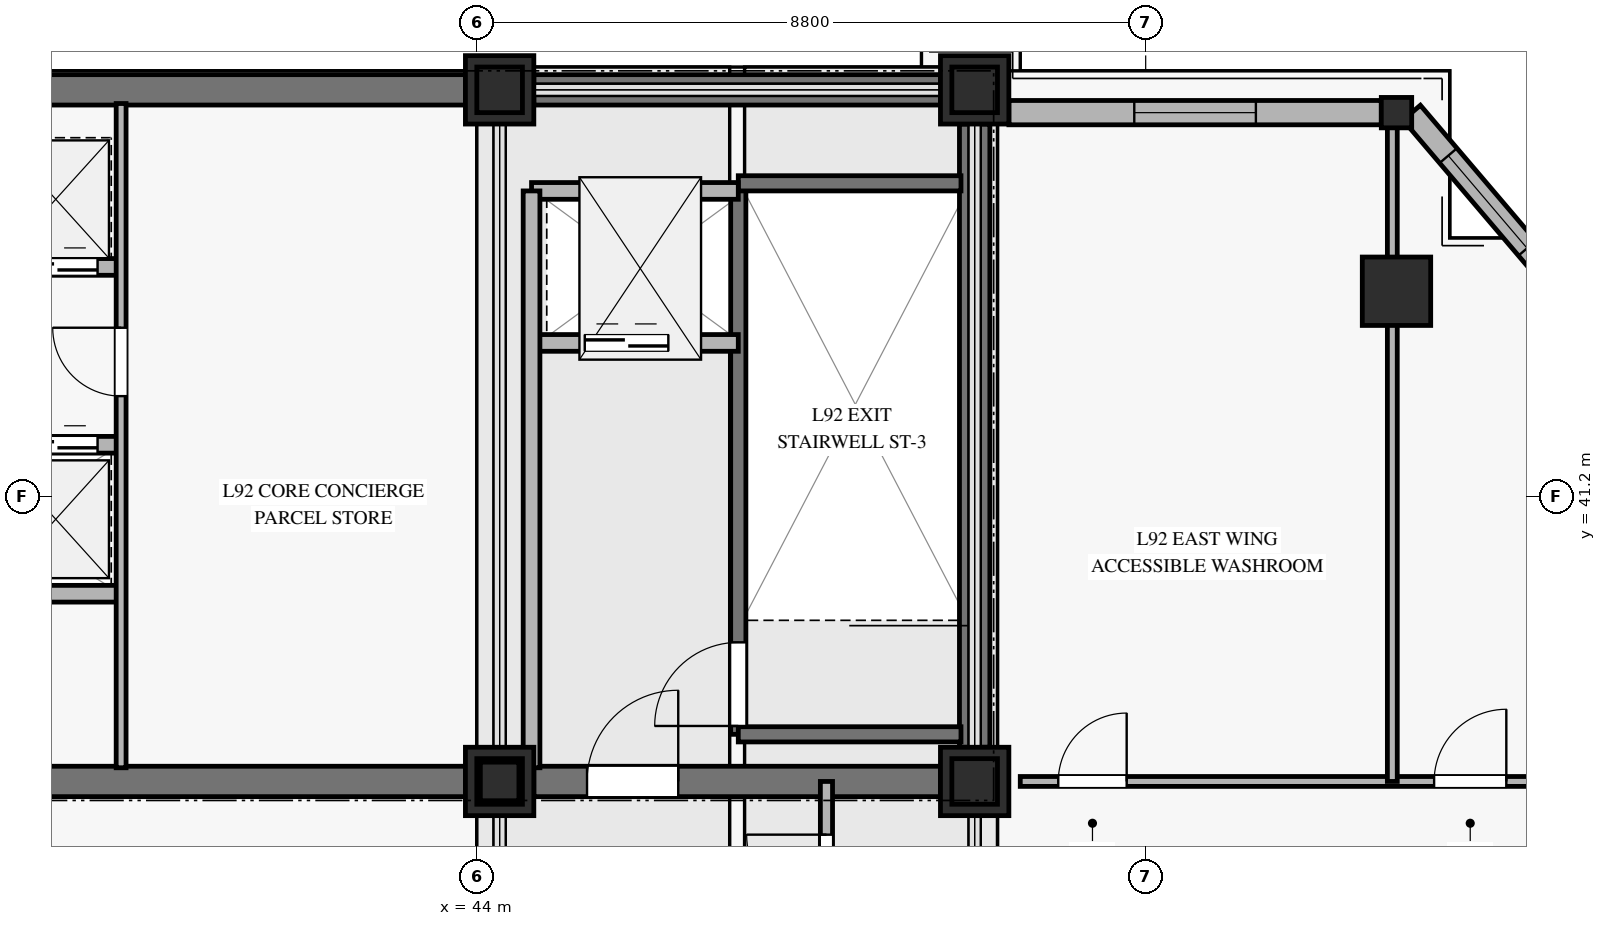
"""IFC4 building model, lengths in metres.
Left out: names, types, materials, properties, quantities, classifications, styles, units other than length and angle.
Written with IfcOpenShell. Run it as: python <this file> out.ifc"""

import sys

from ifc_helpers import new_model, si_unit, direction, frame, frame_2d, origin, origin_2d, place, context, subcontext, project, spatial, rectangle, hollow_rectangle, hollow_circle, extrude, source, transform, mapped, element, fill, save


model = new_model("IFC4")
c1 = context("Model", 3, precision=1e-05, world=origin(), true_north=direction((0.0, 1.0)))
c2 = subcontext(c1, "Body", "Model", "MODEL_VIEW")
j1 = project(units=[si_unit("LENGTHUNIT", "METRE"), si_unit("PLANEANGLEUNIT", "RADIAN")], contexts=[c1])
p1 = place(None, origin())
s1 = spatial("IfcSite", under=j1, at=p1, CompositionType="ELEMENT")
p2 = place(p1, origin())
s2 = spatial("IfcBuilding", under=s1, at=p2, CompositionType="ELEMENT")
p3 = place(p2, frame((0.0, 0.0, 352.7)))
s3 = spatial("IfcBuildingStorey", under=s2, at=p3, CompositionType="ELEMENT", Elevation=352.7)
m1 = source(origin(), c2, "Body", "SweptSolid", [
    extrude(rectangle(XDim=0.9, YDim=0.9, at=origin_2d()), origin(), (0.0, 0.0, 1.0), 6.16),
])
for number, where, z_axis, x_axis in (
    (1, (44.3, 37.45, 0.0), (0.0, 0.0, 1.0), (1.0, 0.0, 0.0)),
    (2, (44.3, 46.55, 0.0), (0.0, 0.0, 1.0), (1.0, 0.0, 0.0)),
    (3, (50.55, 37.45, 0.0), (0.0, 0.0, 1.0), (1.0, 0.0, 0.0)),
    (4, (50.55, 46.55, 0.0), (0.0, 0.0, 1.0), (1.0, 0.0, 0.0)),
):
    element("IfcColumn", number, at=place(p3, frame(where, z_axis=z_axis, x_axis=x_axis)), inside=s3, PredefinedType="PILASTER", context=c2, shape_type="MappedRepresentation", body=[
        mapped(m1, transform((0.0, 0.0, 0.0), x_axis=(1.0, 0.0, 0.0), y_axis=(0.0, 1.0, 0.0), z_axis=(0.0, 0.0, 1.0), scale=1.0)),
    ])
p4 = place(p3, frame((36.05, 46.55, 0.0), z_axis=(0.0, 0.0, 1.0), x_axis=(1.0, 0.0, 0.0)))
e5 = element("IfcWall", 5, at=p4, inside=s3, PredefinedType="SHEAR", context=c2, shape_type="SweptSolid", body=[
    extrude(rectangle(XDim=7.8, YDim=0.4, at=frame_2d((3.9, 0.0))), origin(), (0.0, 0.0, 1.0), 6.16),
])
p5 = place(p3, frame((44.75, 46.55, 0.0), z_axis=(0.0, 0.0, 1.0), x_axis=(1.0, 0.0, 0.0)))
e6 = element("IfcWall", 6, at=p5, inside=s3, PredefinedType="SHEAR", context=c2, shape_type="SweptSolid", body=[
    extrude(rectangle(XDim=5.35, YDim=0.4, at=frame_2d((2.675, 0.0))), origin(), (0.0, 0.0, 1.0), 6.16),
])
p6 = place(p3, frame((36.05, 37.45, 0.0), z_axis=(0.0, 0.0, 1.0), x_axis=(1.0, 0.0, 0.0)))
e7 = element("IfcWall", 7, at=p6, inside=s3, PredefinedType="SHEAR", context=c2, shape_type="SweptSolid", body=[
    extrude(rectangle(XDim=7.8, YDim=0.4, at=frame_2d((3.9, 0.0))), origin(), (0.0, 0.0, 1.0), 6.16),
])
p7 = place(p3, frame((44.75, 37.45, 0.0), z_axis=(0.0, 0.0, 1.0), x_axis=(1.0, 0.0, 0.0)))
e8 = element("IfcWall", 8, at=p7, inside=s3, PredefinedType="SHEAR", context=c2, shape_type="SweptSolid", body=[
    extrude(rectangle(XDim=5.35, YDim=0.4, at=frame_2d((2.675, 0.0))), origin(), (0.0, 0.0, 1.0), 6.16),
])
p8 = place(p7, frame((0.7, 0.0, 0.0)))
e9 = element("IfcOpeningElement", 9, at=p8, cuts=e8, PredefinedType="OPENING", context=c2, shape_type="SweptSolid", body=[
    extrude(rectangle(XDim=1.2, YDim=2.15, at=frame_2d((0.6, 1.075))), frame((0.0, 0.21, 0.0), z_axis=(0.0, -1.0, 0.0), x_axis=(1.0, 0.0, 0.0)), (0.0, 0.0, 1.0), 0.42),
])
p9 = place(p3, frame((50.55, 37.9, 0.0), z_axis=(0.0, 0.0, 1.0), x_axis=(0.0, 1.0, 0.0)))
e10 = element("IfcWall", 10, at=p9, inside=s3, PredefinedType="SHEAR", context=c2, shape_type="SweptSolid", body=[
    extrude(rectangle(XDim=8.2, YDim=0.4, at=frame_2d((4.1, 0.0))), origin(), (0.0, 0.0, 1.0), 6.16),
])
m2 = source(origin(), c2, "Body", "SweptSolid", [
    extrude(hollow_rectangle(XDim=0.9, YDim=0.9, WallThickness=0.04, at=origin_2d()), origin(), (0.0, 0.0, 1.0), 6.16),
])
p10 = place(p3, frame((56.1, 43.9, 0.0), z_axis=(0.0, 0.0, 1.0), x_axis=(1.0, 0.0, 0.0)))
e11 = element("IfcColumn", 11, at=p10, inside=s3, PredefinedType="COLUMN", context=c2, shape_type="MappedRepresentation", body=[
    mapped(m2, transform((0.0, 0.0, 0.0), x_axis=(1.0, 0.0, 0.0), y_axis=(0.0, 1.0, 0.0), z_axis=(0.0, 0.0, 1.0), scale=1.0)),
])
m3 = source(origin(), c2, "Body", "SweptSolid", [
    extrude(hollow_rectangle(XDim=0.4, YDim=0.4, WallThickness=0.02, at=origin_2d()), origin(), (0.0, 0.0, 1.0), 6.16),
])
p11 = place(p3, frame((56.1, 46.25, 0.0), z_axis=(0.0, 0.0, 1.0), x_axis=(1.0, 0.0, 0.0)))
e12 = element("IfcColumn", 12, at=p11, inside=s3, PredefinedType="COLUMN", context=c2, shape_type="MappedRepresentation", body=[
    mapped(m3, transform((0.0, 0.0, 0.0), x_axis=(1.0, 0.0, 0.0), y_axis=(0.0, 1.0, 0.0), z_axis=(0.0, 0.0, 1.0), scale=1.0)),
])
m4 = source(origin(), c2, "Body", "SweptSolid", [
    extrude(hollow_rectangle(XDim=0.6, YDim=0.6, WallThickness=0.028, at=origin_2d()), origin(), (0.0, 0.0, 1.0), 32.096),
])
for number, where, z_axis, x_axis in (
    (13, (50.55, 37.45, 6.4), (0.0, 0.0, 1.0), (1.0, 0.0, 0.0)),
    (14, (50.55, 46.55, 6.4), (0.0, 0.0, 1.0), (1.0, 0.0, 0.0)),
    (15, (44.3, 46.55, 6.4), (0.0, 0.0, 1.0), (1.0, 0.0, 0.0)),
    (16, (44.3, 37.45, 6.4), (0.0, 0.0, 1.0), (1.0, 0.0, 0.0)),
):
    element("IfcColumn", number, at=place(p3, frame(where, z_axis=z_axis, x_axis=x_axis)), inside=s3, PredefinedType="COLUMN", context=c2, shape_type="MappedRepresentation", body=[
        mapped(m4, transform((0.0, 0.0, 0.0), x_axis=(1.0, 0.0, 0.0), y_axis=(0.0, 1.0, 0.0), z_axis=(0.0, 0.0, 1.0), scale=1.0)),
    ])
m5 = source(origin(), c2, "Body", "SweptSolid", [
    extrude(hollow_circle(Radius=0.254, WallThickness=0.024, at=origin_2d()), origin(), (0.0, 0.0, 1.0), 1.704),
])
p12 = place(p3, frame((44.3, 37.45, 38.496), z_axis=(0.0, 0.0, 1.0), x_axis=(1.0, 0.0, 0.0)))
e17 = element("IfcColumn", 17, at=p12, inside=s3, PredefinedType="COLUMN", context=c2, shape_type="MappedRepresentation", body=[
    mapped(m5, transform((0.0, 0.0, 0.0), x_axis=(1.0, 0.0, 0.0), y_axis=(0.0, 1.0, 0.0), z_axis=(0.0, 0.0, 1.0), scale=1.0)),
])
p13 = place(p3, frame((51.0, 46.25, 0.0), z_axis=(0.0, 0.0, 1.0), x_axis=(1.0, 0.0, 0.0)))
e18 = element("IfcWall", 18, at=p13, inside=s3, PredefinedType="SOLIDWALL", context=c2, shape_type="SweptSolid", body=[
    extrude(rectangle(XDim=4.9, YDim=0.32, at=frame_2d((2.45, 0.0))), origin(), (0.0, 0.0, 1.0), 5.79),
])
p14 = place(p13, frame((1.65, 0.0, 0.45)))
e19 = element("IfcOpeningElement", 19, at=p14, cuts=e18, PredefinedType="OPENING", context=c2, shape_type="SweptSolid", body=[
    extrude(rectangle(XDim=1.6, YDim=2.0, at=frame_2d((0.8, 1.0))), frame((0.0, 0.17, 0.0), z_axis=(0.0, -1.0, 0.0), x_axis=(1.0, 0.0, 0.0)), (0.0, 0.0, 1.0), 0.34),
])
p15 = place(p3, frame((58.3, 43.9, 0.0), z_axis=(0.0, 0.0, 1.0), x_axis=(-0.648103010114, 0.761552682538, 0.0)))
e20 = element("IfcWall", 20, at=p15, inside=s3, PredefinedType="SOLIDWALL", context=c2, shape_type="SweptSolid", body=[
    extrude(rectangle(XDim=3.086, YDim=0.3, at=frame_2d((1.543, 0.0))), origin(), (0.0, 0.0, 1.0), 5.79),
])
p16 = place(p15, frame((0.743, 0.0, 0.45)))
e21 = element("IfcOpeningElement", 21, at=p16, cuts=e20, PredefinedType="OPENING", context=c2, shape_type="SweptSolid", body=[
    extrude(rectangle(XDim=1.6, YDim=2.0, at=frame_2d((0.8, 1.0))), frame((0.0, 0.16, 0.0), z_axis=(0.0, -1.0, 0.0), x_axis=(1.0, 0.0, 0.0)), (0.0, 0.0, 1.0), 0.32),
])
p17 = place(p3, frame((47.44, 38.07, 0.0), z_axis=(0.0, 0.0, 1.0), x_axis=(0.0, 1.0, 0.0)))
e22 = element("IfcWall", 22, at=p17, inside=s3, PredefinedType="SOLIDWALL", context=c2, shape_type="SweptSolid", body=[
    extrude(rectangle(XDim=7.25, YDim=0.2, at=frame_2d((3.625, 0.0))), origin(), (0.0, 0.0, 1.0), 6.4),
])
p18 = place(p17, frame((0.11, 0.0, 0.0)))
e23 = element("IfcOpeningElement", 23, at=p18, cuts=e22, PredefinedType="OPENING", context=c2, shape_type="SweptSolid", body=[
    extrude(rectangle(XDim=1.1, YDim=2.15, at=frame_2d((0.55, 1.075))), frame((0.0, 0.11, 0.0), z_axis=(0.0, -1.0, 0.0), x_axis=(1.0, 0.0, 0.0)), (0.0, 0.0, 1.0), 0.22),
])
for number, where, z_axis, x_axis in (
    (24, (47.44, 45.32, 0.0), (0.0, 0.0, 1.0), (1.0, 0.0, 0.0)),
    (25, (47.44, 38.07, 0.0), (0.0, 0.0, 1.0), (1.0, 0.0, 0.0)),
):
    element("IfcWall", number, at=place(p3, frame(where, z_axis=z_axis, x_axis=x_axis)), inside=s3, PredefinedType="SOLIDWALL", context=c2, shape_type="SweptSolid", body=[
        extrude(rectangle(XDim=2.93, YDim=0.2, at=frame_2d((1.465, 0.0))), origin(), (0.0, 0.0, 1.0), 6.4),
    ])
p19 = place(p3, frame((44.72, 43.22, 0.0), z_axis=(0.0, 0.0, 1.0), x_axis=(1.0, 0.0, 0.0)))
e26 = element("IfcWall", 26, at=p19, inside=s3, PredefinedType="SOLIDWALL", context=c2, shape_type="SweptSolid", body=[
    extrude(rectangle(XDim=2.72, YDim=0.22, at=frame_2d((1.36, 0.0))), origin(), (0.0, 0.0, 1.0), 6.16),
])
p20 = place(p19, frame((0.7, 0.0, 0.0)))
e27 = element("IfcOpeningElement", 27, at=p20, cuts=e26, PredefinedType="OPENING", context=c2, shape_type="SweptSolid", body=[
    extrude(rectangle(XDim=1.1, YDim=2.2, at=frame_2d((0.55, 1.1))), frame((0.0, 0.12, 0.0), z_axis=(0.0, -1.0, 0.0), x_axis=(1.0, 0.0, 0.0)), (0.0, 0.0, 1.0), 0.24),
])
p21 = place(p3, frame((44.72, 45.22, 0.0), z_axis=(0.0, 0.0, 1.0), x_axis=(1.0, 0.0, 0.0)))
e28 = element("IfcWall", 28, at=p21, inside=s3, PredefinedType="SOLIDWALL", context=c2, shape_type="SweptSolid", body=[
    extrude(rectangle(XDim=2.72, YDim=0.22, at=frame_2d((1.36, 0.0))), origin(), (0.0, 0.0, 1.0), 6.16),
])
p22 = place(p3, frame((44.72, 37.63, 0.0), z_axis=(0.0, 0.0, 1.0), x_axis=(0.0, 1.0, 0.0)))
e29 = element("IfcWall", 29, at=p22, inside=s3, PredefinedType="SOLIDWALL", context=c2, shape_type="SweptSolid", body=[
    extrude(rectangle(XDim=7.59, YDim=0.22, at=frame_2d((3.795, 0.0))), origin(), (0.0, 0.0, 1.0), 6.16),
])
p23 = place(p3, frame((36.12, 44.22, 0.0), z_axis=(0.0, 0.0, 1.0), x_axis=(1.0, 0.0, 0.0)))
e30 = element("IfcWall", 30, at=p23, inside=s3, PredefinedType="SOLIDWALL", context=c2, shape_type="SweptSolid", body=[
    extrude(rectangle(XDim=3.2, YDim=0.22, at=frame_2d((1.6, 0.0))), origin(), (0.0, 0.0, 1.0), 6.16),
])
p24 = place(p23, frame((0.3, 0.0, 0.0)))
e31 = element("IfcOpeningElement", 31, at=p24, cuts=e30, PredefinedType="OPENING", context=c2, shape_type="SweptSolid", body=[
    extrude(rectangle(XDim=1.1, YDim=2.2, at=frame_2d((0.55, 1.1))), frame((0.0, 0.12, 0.0), z_axis=(0.0, -1.0, 0.0), x_axis=(1.0, 0.0, 0.0)), (0.0, 0.0, 1.0), 0.24),
])
p25 = place(p23, frame((1.79, 0.0, 0.0)))
e32 = element("IfcOpeningElement", 32, at=p25, cuts=e30, PredefinedType="OPENING", context=c2, shape_type="SweptSolid", body=[
    extrude(rectangle(XDim=1.1, YDim=2.2, at=frame_2d((0.55, 1.1))), frame((0.0, 0.12, 0.0), z_axis=(0.0, -1.0, 0.0), x_axis=(1.0, 0.0, 0.0)), (0.0, 0.0, 1.0), 0.24),
])
p26 = place(p3, frame((36.12, 41.88, 0.0), z_axis=(0.0, 0.0, 1.0), x_axis=(1.0, 0.0, 0.0)))
e33 = element("IfcWall", 33, at=p26, inside=s3, PredefinedType="SOLIDWALL", context=c2, shape_type="SweptSolid", body=[
    extrude(rectangle(XDim=3.2, YDim=0.22, at=frame_2d((1.6, 0.0))), origin(), (0.0, 0.0, 1.0), 6.16),
])
p27 = place(p26, frame((0.3, 0.0, 0.0)))
e34 = element("IfcOpeningElement", 34, at=p27, cuts=e33, PredefinedType="OPENING", context=c2, shape_type="SweptSolid", body=[
    extrude(rectangle(XDim=1.1, YDim=2.2, at=frame_2d((0.55, 1.1))), frame((0.0, 0.12, 0.0), z_axis=(0.0, -1.0, 0.0), x_axis=(1.0, 0.0, 0.0)), (0.0, 0.0, 1.0), 0.24),
])
p28 = place(p26, frame((1.79, 0.0, 0.0)))
e35 = element("IfcOpeningElement", 35, at=p28, cuts=e33, PredefinedType="OPENING", context=c2, shape_type="SweptSolid", body=[
    extrude(rectangle(XDim=1.1, YDim=2.2, at=frame_2d((0.55, 1.1))), frame((0.0, 0.12, 0.0), z_axis=(0.0, -1.0, 0.0), x_axis=(1.0, 0.0, 0.0)), (0.0, 0.0, 1.0), 0.24),
])
p29 = place(p3, frame((36.12, 39.92, 0.0), z_axis=(0.0, 0.0, 1.0), x_axis=(1.0, 0.0, 0.0)))
e36 = element("IfcWall", 36, at=p29, inside=s3, PredefinedType="SOLIDWALL", context=c2, shape_type="SweptSolid", body=[
    extrude(rectangle(XDim=3.2, YDim=0.22, at=frame_2d((1.6, 0.0))), origin(), (0.0, 0.0, 1.0), 6.16),
])
p30 = place(p3, frame((39.32, 37.63, 0.0), z_axis=(0.0, 0.0, 1.0), x_axis=(0.0, 1.0, 0.0)))
e37 = element("IfcWall", 37, at=p30, inside=s3, PredefinedType="PARTITIONING", context=c2, shape_type="SweptSolid", body=[
    extrude(rectangle(XDim=8.74, YDim=0.13, at=frame_2d((4.37, 0.0))), origin(), (0.0, 0.0, 1.0), 6.16),
])
p31 = place(p30, frame((4.89, 0.0, 0.0)))
e38 = element("IfcOpeningElement", 38, at=p31, cuts=e37, PredefinedType="OPENING", context=c2, shape_type="SweptSolid", body=[
    extrude(rectangle(XDim=0.9, YDim=2.1, at=frame_2d((0.45, 1.05))), frame((0.0, 0.075, 0.0), z_axis=(0.0, -1.0, 0.0), x_axis=(1.0, 0.0, 0.0)), (0.0, 0.0, 1.0), 0.15),
])
p32 = place(p3, frame((48.6, 23.5, 0.0), z_axis=(0.0, 0.0, 1.0), x_axis=(0.0, 1.0, 0.0)))
e39 = element("IfcWall", 39, at=p32, inside=s3, PredefinedType="PARTITIONING", context=c2, shape_type="SweptSolid", body=[
    extrude(rectangle(XDim=13.95, YDim=0.16, at=frame_2d((6.975, 0.0))), origin(), (0.0, 0.0, 1.0), 5.745),
])
p33 = place(p32, frame((12.2, 0.0, 0.0)))
e40 = element("IfcOpeningElement", 40, at=p33, cuts=e39, PredefinedType="OPENING", context=c2, shape_type="SweptSolid", body=[
    extrude(rectangle(XDim=1.05, YDim=2.15, at=frame_2d((0.525, 1.075))), frame((0.0, 0.09, 0.0), z_axis=(0.0, -1.0, 0.0), x_axis=(1.0, 0.0, 0.0)), (0.0, 0.0, 1.0), 0.18),
])
p34 = place(p3, frame((51.15, 37.45, 0.0), z_axis=(0.0, 0.0, 1.0), x_axis=(1.0, 0.0, 0.0)))
e41 = element("IfcWall", 41, at=p34, inside=s3, PredefinedType="PARTITIONING", context=c2, shape_type="SweptSolid", body=[
    extrude(rectangle(XDim=7.15, YDim=0.13, at=frame_2d((3.575, 0.0))), origin(), (0.0, 0.0, 1.0), 5.795),
])
p35 = place(p34, frame((0.5, 0.0, 0.0)))
e42 = element("IfcOpeningElement", 42, at=p35, cuts=e41, PredefinedType="OPENING", context=c2, shape_type="SweptSolid", body=[
    extrude(rectangle(XDim=0.9, YDim=2.1, at=frame_2d((0.45, 1.05))), frame((0.0, 0.075, 0.0), z_axis=(0.0, -1.0, 0.0), x_axis=(1.0, 0.0, 0.0)), (0.0, 0.0, 1.0), 0.15),
])
p36 = place(p34, frame((5.445, 0.0, 0.0)))
e43 = element("IfcOpeningElement", 43, at=p36, cuts=e41, PredefinedType="OPENING", context=c2, shape_type="SweptSolid", body=[
    extrude(rectangle(XDim=0.95, YDim=2.1, at=frame_2d((0.475, 1.05))), frame((0.0, 0.075, 0.0), z_axis=(0.0, -1.0, 0.0), x_axis=(1.0, 0.0, 0.0)), (0.0, 0.0, 1.0), 0.15),
])
p37 = place(p3, frame((56.045, 37.45, 0.0), z_axis=(0.0, 0.0, 1.0), x_axis=(0.0, 1.0, 0.0)))
e44 = element("IfcWall", 44, at=p37, inside=s3, PredefinedType="PARTITIONING", context=c2, shape_type="SweptSolid", body=[
    extrude(rectangle(XDim=8.8, YDim=0.13, at=frame_2d((4.4, 0.0))), origin(), (0.0, 0.0, 1.0), 5.795),
])
m6 = source(origin(), c2, "Body", "SweptSolid", [
    extrude(rectangle(XDim=1.6, YDim=2.0, at=frame_2d((0.8, 1.0))), frame((0.0, 0.03, 0.0), z_axis=(0.0, -1.0, 0.0), x_axis=(1.0, 0.0, 0.0)), (0.0, 0.0, 1.0), 0.06),
])
p38 = place(p14, origin())
e45 = element("IfcWindow", 45, at=p38, inside=s3, PartitioningType="SINGLE_PANEL", PredefinedType="WINDOW", context=c2, shape_type="MappedRepresentation", body=[
    mapped(m6, transform((0.0, 0.0, 0.0), x_axis=(1.0, 0.0, 0.0), y_axis=(0.0, 1.0, 0.0), z_axis=(0.0, 0.0, 1.0), scale=1.0)),
])
fill(e19, e45)
p39 = place(p16, origin())
e46 = element("IfcWindow", 46, at=p39, inside=s3, PartitioningType="SINGLE_PANEL", PredefinedType="WINDOW", context=c2, shape_type="MappedRepresentation", body=[
    mapped(m6, transform((0.0, 0.0, 0.0), x_axis=(1.0, 0.0, 0.0), y_axis=(0.0, 1.0, 0.0), z_axis=(0.0, 0.0, 1.0), scale=1.0)),
])
fill(e21, e46)
m7 = source(origin(), c2, "Body", "SweptSolid", [
    extrude(rectangle(XDim=1.1, YDim=2.15, at=frame_2d((0.55, 1.075))), frame((0.0, 0.025, 0.0), z_axis=(0.0, -1.0, 0.0), x_axis=(1.0, 0.0, 0.0)), (0.0, 0.0, 1.0), 0.05),
])
p40 = place(p18, origin())
e47 = element("IfcDoor", 47, at=p40, inside=s3, OperationType="SINGLE_SWING_LEFT", PredefinedType="DOOR", context=c2, shape_type="MappedRepresentation", body=[
    mapped(m7, transform((0.0, 0.0, 0.0), x_axis=(1.0, 0.0, 0.0), y_axis=(0.0, 1.0, 0.0), z_axis=(0.0, 0.0, 1.0), scale=1.0)),
])
fill(e23, e47)
m8 = source(origin(), c2, "Body", "SweptSolid", [
    extrude(rectangle(XDim=1.1, YDim=2.2, at=frame_2d((0.55, 1.1))), frame((0.0, 0.025, 0.0), z_axis=(0.0, -1.0, 0.0), x_axis=(1.0, 0.0, 0.0)), (0.0, 0.0, 1.0), 0.05),
])
p41 = place(p20, origin())
e48 = element("IfcDoor", 48, at=p41, inside=s3, OperationType="SLIDING_TO_LEFT", PredefinedType="DOOR", context=c2, shape_type="MappedRepresentation", body=[
    mapped(m8, transform((0.0, 0.0, 0.0), x_axis=(1.0, 0.0, 0.0), y_axis=(0.0, 1.0, 0.0), z_axis=(0.0, 0.0, 1.0), scale=1.0)),
])
fill(e27, e48)
m9 = source(origin(), c2, "Body", "SweptSolid", [
    extrude(rectangle(XDim=1.2, YDim=2.15, at=frame_2d((0.6, 1.075))), frame((0.0, 0.025, 0.0), z_axis=(0.0, -1.0, 0.0), x_axis=(1.0, 0.0, 0.0)), (0.0, 0.0, 1.0), 0.05),
])
p42 = place(p8, origin())
e49 = element("IfcDoor", 49, at=p42, inside=s3, OperationType="SINGLE_SWING_RIGHT", PredefinedType="DOOR", context=c2, shape_type="MappedRepresentation", body=[
    mapped(m9, transform((0.0, 0.0, 0.0), x_axis=(1.0, 0.0, 0.0), y_axis=(0.0, 1.0, 0.0), z_axis=(0.0, 0.0, 1.0), scale=1.0)),
])
fill(e9, e49)
p43 = place(p25, origin())
e50 = element("IfcDoor", 50, at=p43, inside=s3, OperationType="SLIDING_TO_LEFT", PredefinedType="DOOR", context=c2, shape_type="MappedRepresentation", body=[
    mapped(m8, transform((0.0, 0.0, 0.0), x_axis=(1.0, 0.0, 0.0), y_axis=(0.0, 1.0, 0.0), z_axis=(0.0, 0.0, 1.0), scale=1.0)),
])
fill(e32, e50)
p44 = place(p28, origin())
e51 = element("IfcDoor", 51, at=p44, inside=s3, OperationType="SLIDING_TO_LEFT", PredefinedType="DOOR", context=c2, shape_type="MappedRepresentation", body=[
    mapped(m8, transform((0.0, 0.0, 0.0), x_axis=(1.0, 0.0, 0.0), y_axis=(0.0, 1.0, 0.0), z_axis=(0.0, 0.0, 1.0), scale=1.0)),
])
fill(e35, e51)
m10 = source(origin(), c2, "Body", "SweptSolid", [
    extrude(rectangle(XDim=0.9, YDim=2.1, at=frame_2d((0.45, 1.05))), frame((0.0, 0.025, 0.0), z_axis=(0.0, -1.0, 0.0), x_axis=(1.0, 0.0, 0.0)), (0.0, 0.0, 1.0), 0.05),
])
p45 = place(p31, origin())
e52 = element("IfcDoor", 52, at=p45, inside=s3, OperationType="SINGLE_SWING_RIGHT", PredefinedType="DOOR", context=c2, shape_type="MappedRepresentation", body=[
    mapped(m10, transform((0.0, 0.0, 0.0), x_axis=(1.0, 0.0, 0.0), y_axis=(0.0, 1.0, 0.0), z_axis=(0.0, 0.0, 1.0), scale=1.0)),
])
fill(e38, e52)
m11 = source(origin(), c2, "Body", "SweptSolid", [
    extrude(rectangle(XDim=1.05, YDim=2.15, at=frame_2d((0.525, 1.075))), frame((0.0, 0.025, 0.0), z_axis=(0.0, -1.0, 0.0), x_axis=(1.0, 0.0, 0.0)), (0.0, 0.0, 1.0), 0.05),
])
p46 = place(p33, origin())
e53 = element("IfcDoor", 53, at=p46, inside=s3, OperationType="SINGLE_SWING_RIGHT", PredefinedType="DOOR", context=c2, shape_type="MappedRepresentation", body=[
    mapped(m11, transform((0.0, 0.0, 0.0), x_axis=(1.0, 0.0, 0.0), y_axis=(0.0, 1.0, 0.0), z_axis=(0.0, 0.0, 1.0), scale=1.0)),
])
fill(e40, e53)
p47 = place(p35, origin())
e54 = element("IfcDoor", 54, at=p47, inside=s3, OperationType="SINGLE_SWING_RIGHT", PredefinedType="DOOR", context=c2, shape_type="MappedRepresentation", body=[
    mapped(m10, transform((0.0, 0.0, 0.0), x_axis=(1.0, 0.0, 0.0), y_axis=(0.0, 1.0, 0.0), z_axis=(0.0, 0.0, 1.0), scale=1.0)),
])
fill(e42, e54)
m12 = source(origin(), c2, "Body", "SweptSolid", [
    extrude(rectangle(XDim=0.95, YDim=2.1, at=frame_2d((0.475, 1.05))), frame((0.0, 0.025, 0.0), z_axis=(0.0, -1.0, 0.0), x_axis=(1.0, 0.0, 0.0)), (0.0, 0.0, 1.0), 0.05),
])
p48 = place(p36, origin())
e55 = element("IfcDoor", 55, at=p48, inside=s3, OperationType="SINGLE_SWING_RIGHT", PredefinedType="DOOR", context=c2, shape_type="MappedRepresentation", body=[
    mapped(m12, transform((0.0, 0.0, 0.0), x_axis=(1.0, 0.0, 0.0), y_axis=(0.0, 1.0, 0.0), z_axis=(0.0, 0.0, 1.0), scale=1.0)),
])
fill(e43, e55)
save(model, sys.argv[1])
